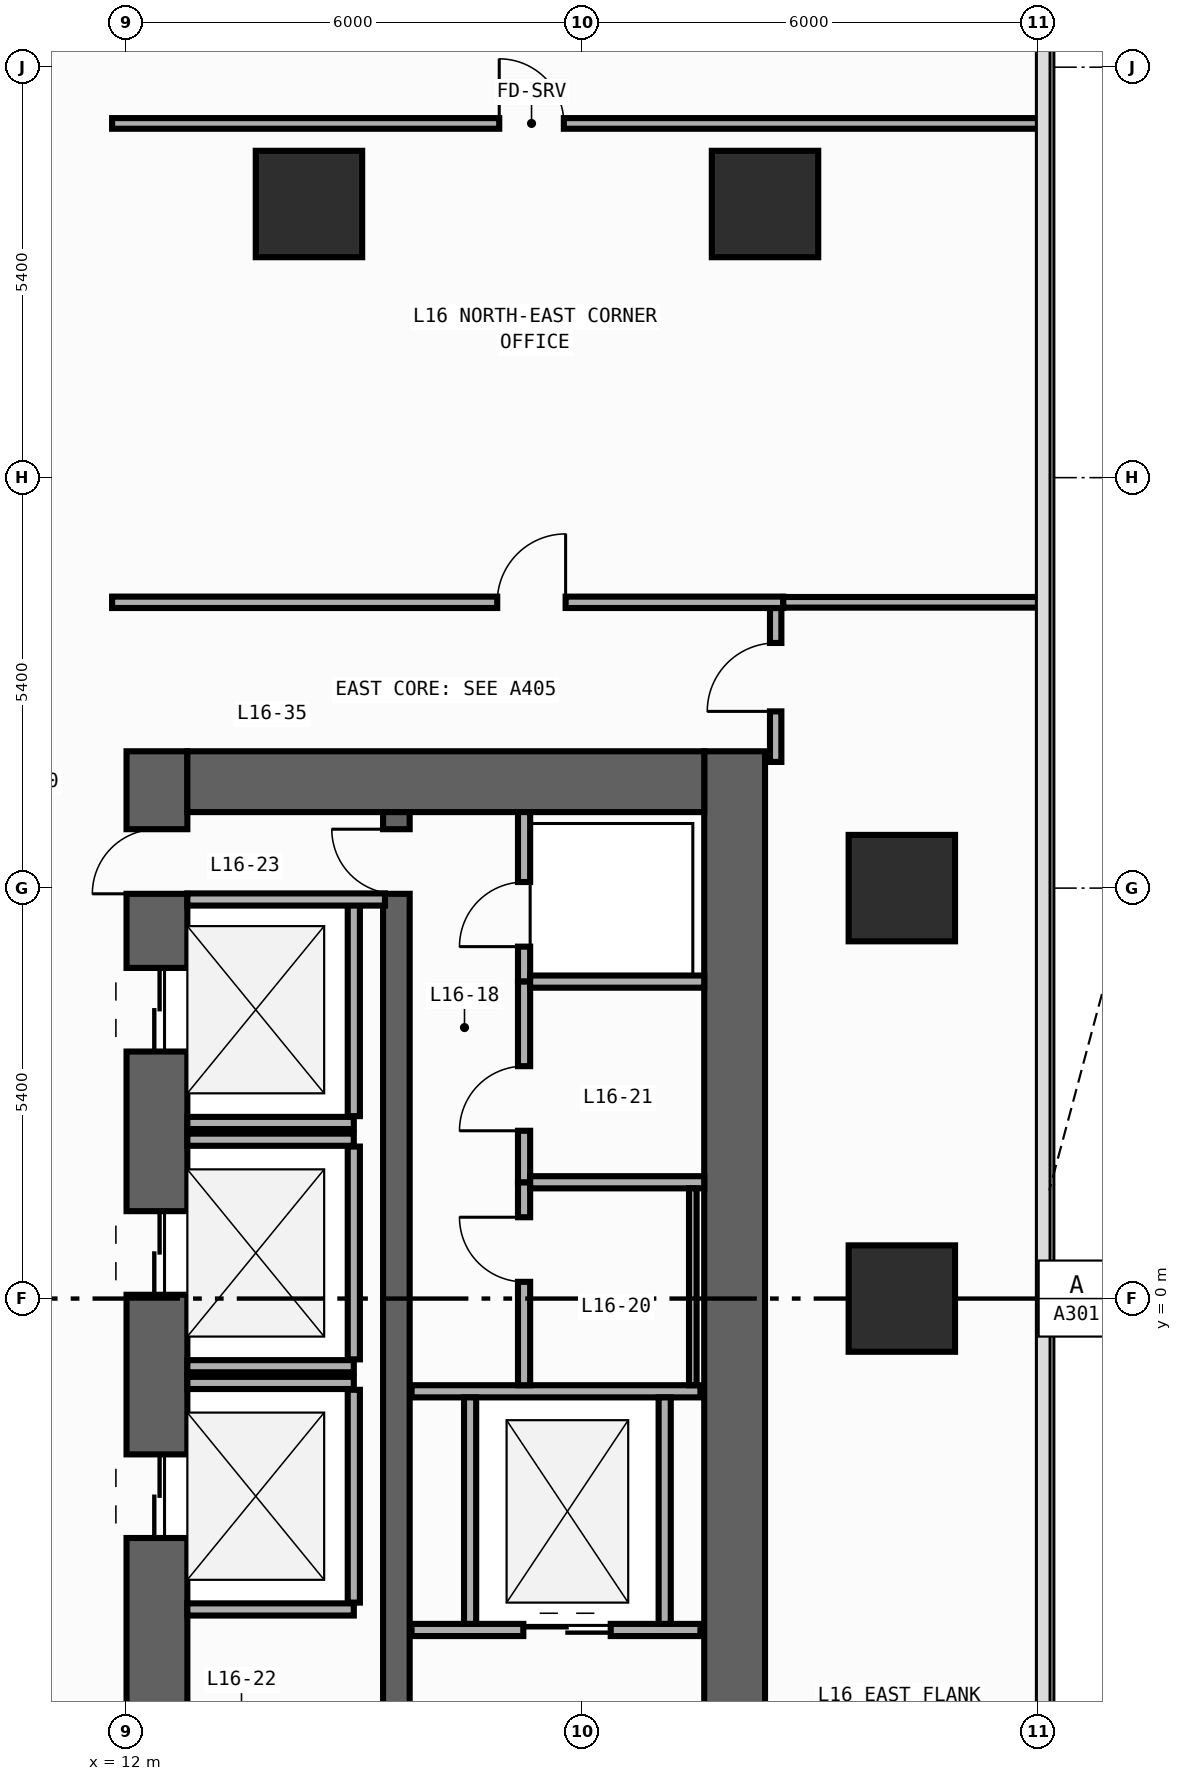
"""IFC4 building model, lengths in metres.
Left out: names, types, materials, properties, quantities, classifications, styles, units other than length and angle.
Written with IfcOpenShell. Run it as: python <this file> out.ifc"""

import sys

from ifc_helpers import new_model, si_unit, direction, frame, frame_2d, origin, origin_2d, place, context, subcontext, project, spatial, rectangle, extrude, element, fill, save


model = new_model("IFC4")
c1 = context("Model", 3, precision=1e-05, world=origin(), true_north=direction((0.0, 1.0)))
c2 = subcontext(c1, "Body", "Model", "MODEL_VIEW")
j1 = project(units=[si_unit("LENGTHUNIT", "METRE"), si_unit("PLANEANGLEUNIT", "RADIAN")], contexts=[c1])
p1 = place(None, origin())
s1 = spatial("IfcSite", under=j1, at=p1, CompositionType="ELEMENT")
p2 = place(p1, origin())
s2 = spatial("IfcBuilding", under=s1, at=p2, CompositionType="ELEMENT")
p3 = place(p2, frame((0.0, 0.0, 68.0)))
s3 = spatial("IfcBuildingStorey", under=s2, at=p3, CompositionType="ELEMENT", Elevation=68.0)
p4 = place(p3, frame((12.4, -19.8, 0.0), z_axis=(0.0, 0.0, 1.0), x_axis=(0.0, 1.0, 0.0)))
e1 = element("IfcWall", 1, at=p4, inside=s3, PredefinedType="SHEAR", context=c2, shape_type="SweptSolid", body=[
    extrude(rectangle(XDim=27.0, YDim=0.8, at=frame_2d((13.5, 0.0))), origin(), (0.0, 0.0, 1.0), 3.94),
])
p5 = place(p4, frame((23.05, 0.0, 0.0)))
e2 = element("IfcOpeningElement", 2, at=p5, cuts=e1, PredefinedType="OPENING", context=c2, shape_type="SweptSolid", body=[
    extrude(rectangle(XDim=1.1, YDim=2.2, at=frame_2d((0.55, 1.1))), frame((0.0, 0.41, 0.0), z_axis=(0.0, -1.0, 0.0), x_axis=(1.0, 0.0, 0.0)), (0.0, 0.0, 1.0), 0.82),
])
p6 = place(p4, frame((19.85, 0.0, 0.0)))
e3 = element("IfcOpeningElement", 3, at=p6, cuts=e1, PredefinedType="OPENING", context=c2, shape_type="SweptSolid", body=[
    extrude(rectangle(XDim=1.1, YDim=2.2, at=frame_2d((0.55, 1.1))), frame((0.0, 0.41, 0.0), z_axis=(0.0, -1.0, 0.0), x_axis=(1.0, 0.0, 0.0)), (0.0, 0.0, 1.0), 0.82),
])
p7 = place(p4, frame((16.65, 0.0, 0.0)))
e4 = element("IfcOpeningElement", 4, at=p7, cuts=e1, PredefinedType="OPENING", context=c2, shape_type="SweptSolid", body=[
    extrude(rectangle(XDim=1.1, YDim=2.2, at=frame_2d((0.55, 1.1))), frame((0.0, 0.41, 0.0), z_axis=(0.0, -1.0, 0.0), x_axis=(1.0, 0.0, 0.0)), (0.0, 0.0, 1.0), 0.82),
])
p8 = place(p4, frame((7.175, 0.0, 0.0)))
e5 = element("IfcOpeningElement", 5, at=p8, cuts=e1, PredefinedType="OPENING", context=c2, shape_type="SweptSolid", body=[
    extrude(rectangle(XDim=0.85, YDim=2.1, at=frame_2d((0.425, 1.05))), frame((0.0, 0.41, 0.0), z_axis=(0.0, -1.0, 0.0), x_axis=(1.0, 0.0, 0.0)), (0.0, 0.0, 1.0), 0.82),
])
p9 = place(p4, frame((10.375, 0.0, 0.0)))
e6 = element("IfcOpeningElement", 6, at=p9, cuts=e1, PredefinedType="OPENING", context=c2, shape_type="SweptSolid", body=[
    extrude(rectangle(XDim=0.85, YDim=2.1, at=frame_2d((0.425, 1.05))), frame((0.0, 0.41, 0.0), z_axis=(0.0, -1.0, 0.0), x_axis=(1.0, 0.0, 0.0)), (0.0, 0.0, 1.0), 0.82),
])
p10 = place(p4, frame((12.725, 0.0, 0.0)))
e7 = element("IfcOpeningElement", 7, at=p10, cuts=e1, PredefinedType="OPENING", context=c2, shape_type="SweptSolid", body=[
    extrude(rectangle(XDim=1.15, YDim=2.2, at=frame_2d((0.575, 1.1))), frame((0.0, 0.41, 0.0), z_axis=(0.0, -1.0, 0.0), x_axis=(1.0, 0.0, 0.0)), (0.0, 0.0, 1.0), 0.82),
])
p11 = place(p4, frame((25.125, 0.0, 0.0)))
e8 = element("IfcOpeningElement", 8, at=p11, cuts=e1, PredefinedType="OPENING", context=c2, shape_type="SweptSolid", body=[
    extrude(rectangle(XDim=0.85, YDim=2.1, at=frame_2d((0.425, 1.05))), frame((0.0, 0.41, 0.0), z_axis=(0.0, -1.0, 0.0), x_axis=(1.0, 0.0, 0.0)), (0.0, 0.0, 1.0), 0.82),
])
p12 = place(p3, frame((20.0, -19.8, 0.0), z_axis=(0.0, 0.0, 1.0), x_axis=(0.0, 1.0, 0.0)))
e9 = element("IfcWall", 9, at=p12, inside=s3, PredefinedType="SHEAR", context=c2, shape_type="SweptSolid", body=[
    extrude(rectangle(XDim=27.0, YDim=0.8, at=frame_2d((13.5, 0.0))), origin(), (0.0, 0.0, 1.0), 3.94),
])
p13 = place(p3, frame((12.8, 6.8, 0.0), z_axis=(0.0, 0.0, 1.0), x_axis=(1.0, 0.0, 0.0)))
e10 = element("IfcWall", 10, at=p13, inside=s3, PredefinedType="SHEAR", context=c2, shape_type="SweptSolid", body=[
    extrude(rectangle(XDim=6.8, YDim=0.8, at=frame_2d((3.4, 0.0))), origin(), (0.0, 0.0, 1.0), 3.94),
])
p14 = place(p3, frame((15.55, -19.0, 0.0), z_axis=(0.0, 0.0, 1.0), x_axis=(0.0, 1.0, 0.0)))
e11 = element("IfcWall", 11, at=p14, inside=s3, PredefinedType="SHEAR", context=c2, shape_type="SweptSolid", body=[
    extrude(rectangle(XDim=25.4, YDim=0.35, at=frame_2d((12.7, 0.0))), origin(), (0.0, 0.0, 1.0), 3.94),
])
p15 = place(p14, frame((11.925, 0.0, 0.0)))
e12 = element("IfcOpeningElement", 12, at=p15, cuts=e11, PredefinedType="OPENING", context=c2, shape_type="SweptSolid", body=[
    extrude(rectangle(XDim=1.15, YDim=2.2, at=frame_2d((0.575, 1.1))), frame((0.0, 0.185, 0.0), z_axis=(0.0, -1.0, 0.0), x_axis=(1.0, 0.0, 0.0)), (0.0, 0.0, 1.0), 0.37),
])
p16 = place(p14, frame((24.325, 0.0, 0.0)))
e13 = element("IfcOpeningElement", 13, at=p16, cuts=e11, PredefinedType="OPENING", context=c2, shape_type="SweptSolid", body=[
    extrude(rectangle(XDim=0.85, YDim=2.1, at=frame_2d((0.425, 1.05))), frame((0.0, 0.185, 0.0), z_axis=(0.0, -1.0, 0.0), x_axis=(1.0, 0.0, 0.0)), (0.0, 0.0, 1.0), 0.37),
])
for number, where, z_axis, x_axis in (
    (14, (20.4, 14.4, 0.0), (0.0, 0.0, 1.0), (1.0, 0.0, 0.0)),
    (15, (14.4, 14.4, 0.0), (0.0, 0.0, 1.0), (1.0, 0.0, 0.0)),
    (16, (22.2, 0.0, 0.0), (0.0, 0.0, 1.0), (1.0, 0.0, 0.0)),
    (17, (22.2, 5.4, 0.0), (0.0, 0.0, 1.0), (1.0, 0.0, 0.0)),
):
    element("IfcColumn", number, at=place(p3, frame(where, z_axis=z_axis, x_axis=x_axis)), inside=s3, PredefinedType="COLUMN", context=c2, shape_type="SweptSolid", body=[
        extrude(rectangle(XDim=1.4, YDim=1.4, at=origin_2d()), origin(), (0.0, 0.0, 1.0), 4.2),
    ])
p17 = place(p3, frame((12.8, 2.31, 0.0), z_axis=(0.0, 0.0, 1.0), x_axis=(1.0, 0.0, 0.0)))
e18 = element("IfcWall", 18, at=p17, inside=s3, PredefinedType="STANDARD", context=c2, shape_type="SweptSolid", body=[
    extrude(rectangle(XDim=2.19, YDim=0.16, at=frame_2d((1.095, 0.0))), origin(), (0.0, 0.0, 1.0), 3.94),
])
p18 = place(p3, frame((14.99, 2.4, 0.0), z_axis=(0.0, 0.0, 1.0), x_axis=(0.0, 1.0, 0.0)))
e19 = element("IfcWall", 19, at=p18, inside=s3, PredefinedType="STANDARD", context=c2, shape_type="SweptSolid", body=[
    extrude(rectangle(XDim=2.8, YDim=0.16, at=frame_2d((1.4, 0.0))), origin(), (0.0, 0.0, 1.0), 3.94),
])
for number, where, z_axis, x_axis in (
    (20, (12.8, -0.89, 0.0), (0.0, 0.0, 1.0), (1.0, 0.0, 0.0)),
    (21, (12.8, 2.09, 0.0), (0.0, 0.0, 1.0), (1.0, 0.0, 0.0)),
):
    element("IfcWall", number, at=place(p3, frame(where, z_axis=z_axis, x_axis=x_axis)), inside=s3, PredefinedType="STANDARD", context=c2, shape_type="SweptSolid", body=[
        extrude(rectangle(XDim=2.19, YDim=0.16, at=frame_2d((1.095, 0.0))), origin(), (0.0, 0.0, 1.0), 3.94),
    ])
p19 = place(p3, frame((14.99, -0.8, 0.0), z_axis=(0.0, 0.0, 1.0), x_axis=(0.0, 1.0, 0.0)))
e22 = element("IfcWall", 22, at=p19, inside=s3, PredefinedType="STANDARD", context=c2, shape_type="SweptSolid", body=[
    extrude(rectangle(XDim=2.8, YDim=0.16, at=frame_2d((1.4, 0.0))), origin(), (0.0, 0.0, 1.0), 3.94),
])
for number, where, z_axis, x_axis in (
    (23, (12.8, -4.09, 0.0), (0.0, 0.0, 1.0), (1.0, 0.0, 0.0)),
    (24, (12.8, -1.11, 0.0), (0.0, 0.0, 1.0), (1.0, 0.0, 0.0)),
):
    element("IfcWall", number, at=place(p3, frame(where, z_axis=z_axis, x_axis=x_axis)), inside=s3, PredefinedType="STANDARD", context=c2, shape_type="SweptSolid", body=[
        extrude(rectangle(XDim=2.19, YDim=0.16, at=frame_2d((1.095, 0.0))), origin(), (0.0, 0.0, 1.0), 3.94),
    ])
p20 = place(p3, frame((14.99, -4.0, 0.0), z_axis=(0.0, 0.0, 1.0), x_axis=(0.0, 1.0, 0.0)))
e25 = element("IfcWall", 25, at=p20, inside=s3, PredefinedType="STANDARD", context=c2, shape_type="SweptSolid", body=[
    extrude(rectangle(XDim=2.8, YDim=0.16, at=frame_2d((1.4, 0.0))), origin(), (0.0, 0.0, 1.0), 3.94),
])
p21 = place(p3, frame((15.75, -4.36, 0.0), z_axis=(0.0, 0.0, 1.0), x_axis=(1.0, 0.0, 0.0)))
e26 = element("IfcWall", 26, at=p21, inside=s3, PredefinedType="STANDARD", context=c2, shape_type="SweptSolid", body=[
    extrude(rectangle(XDim=3.8, YDim=0.16, at=frame_2d((1.9, 0.0))), origin(), (0.0, 0.0, 1.0), 3.94),
])
p22 = place(p21, frame((1.47, 0.0, 0.0)))
e27 = element("IfcOpeningElement", 27, at=p22, cuts=e26, PredefinedType="OPENING", context=c2, shape_type="SweptSolid", body=[
    extrude(rectangle(XDim=1.15, YDim=2.2, at=frame_2d((0.575, 1.1))), frame((0.0, 0.09, 0.0), z_axis=(0.0, -1.0, 0.0), x_axis=(1.0, 0.0, 0.0)), (0.0, 0.0, 1.0), 0.18),
])
p23 = place(p3, frame((15.75, -1.22, 0.0), z_axis=(0.0, 0.0, 1.0), x_axis=(1.0, 0.0, 0.0)))
e28 = element("IfcWall", 28, at=p23, inside=s3, PredefinedType="STANDARD", context=c2, shape_type="SweptSolid", body=[
    extrude(rectangle(XDim=3.8, YDim=0.16, at=frame_2d((1.9, 0.0))), origin(), (0.0, 0.0, 1.0), 3.94),
])
for number, where, z_axis, x_axis in (
    (29, (16.52, -4.28, 0.0), (0.0, 0.0, 1.0), (0.0, 1.0, 0.0)),
    (30, (19.08, -4.28, 0.0), (0.0, 0.0, 1.0), (0.0, 1.0, 0.0)),
):
    element("IfcWall", number, at=place(p3, frame(where, z_axis=z_axis, x_axis=x_axis)), inside=s3, PredefinedType="STANDARD", context=c2, shape_type="SweptSolid", body=[
        extrude(rectangle(XDim=2.98, YDim=0.16, at=frame_2d((1.49, 0.0))), origin(), (0.0, 0.0, 1.0), 3.94),
    ])
p24 = place(p3, frame((12.8, 5.25, 0.0), z_axis=(0.0, 0.0, 1.0), x_axis=(1.0, 0.0, 0.0)))
e31 = element("IfcWall", 31, at=p24, inside=s3, PredefinedType="STANDARD", context=c2, shape_type="SweptSolid", body=[
    extrude(rectangle(XDim=2.6, YDim=0.16, at=frame_2d((1.3, 0.0))), origin(), (0.0, 0.0, 1.0), 3.94),
])
p25 = place(p3, frame((17.23, 4.17, 0.0), z_axis=(0.0, 0.0, 1.0), x_axis=(0.0, 1.0, 0.0)))
e32 = element("IfcWall", 32, at=p25, inside=s3, PredefinedType="PARTITIONING", context=c2, shape_type="SweptSolid", body=[
    extrude(rectangle(XDim=2.23, YDim=0.16, at=frame_2d((1.115, 0.0))), origin(), (0.0, 0.0, 1.0), 3.94),
])
p26 = place(p25, frame((0.46, 0.0, 0.0)))
e33 = element("IfcOpeningElement", 33, at=p26, cuts=e32, PredefinedType="OPENING", context=c2, shape_type="SweptSolid", body=[
    extrude(rectangle(XDim=0.85, YDim=2.1, at=frame_2d((0.425, 1.05))), frame((0.0, 0.09, 0.0), z_axis=(0.0, -1.0, 0.0), x_axis=(1.0, 0.0, 0.0)), (0.0, 0.0, 1.0), 0.18),
])
p27 = place(p3, frame((17.23, -1.14, 0.0), z_axis=(0.0, 0.0, 1.0), x_axis=(0.0, 1.0, 0.0)))
e34 = element("IfcWall", 34, at=p27, inside=s3, PredefinedType="PARTITIONING", context=c2, shape_type="SweptSolid", body=[
    extrude(rectangle(XDim=2.67, YDim=0.16, at=frame_2d((1.335, 0.0))), origin(), (0.0, 0.0, 1.0), 3.94),
])
p28 = place(p27, frame((1.36, 0.0, 0.0)))
e35 = element("IfcOpeningElement", 35, at=p28, cuts=e34, PredefinedType="OPENING", context=c2, shape_type="SweptSolid", body=[
    extrude(rectangle(XDim=0.85, YDim=2.1, at=frame_2d((0.425, 1.05))), frame((0.0, 0.09, 0.0), z_axis=(0.0, -1.0, 0.0), x_axis=(1.0, 0.0, 0.0)), (0.0, 0.0, 1.0), 0.18),
])
p29 = place(p3, frame((17.23, 1.53, 0.0), z_axis=(0.0, 0.0, 1.0), x_axis=(0.0, 1.0, 0.0)))
e36 = element("IfcWall", 36, at=p29, inside=s3, PredefinedType="PARTITIONING", context=c2, shape_type="SweptSolid", body=[
    extrude(rectangle(XDim=2.64, YDim=0.16, at=frame_2d((1.32, 0.0))), origin(), (0.0, 0.0, 1.0), 3.94),
])
p30 = place(p29, frame((0.677, 0.0, 0.0)))
e37 = element("IfcOpeningElement", 37, at=p30, cuts=e36, PredefinedType="OPENING", context=c2, shape_type="SweptSolid", body=[
    extrude(rectangle(XDim=0.85, YDim=2.1, at=frame_2d((0.425, 1.05))), frame((0.0, 0.09, 0.0), z_axis=(0.0, -1.0, 0.0), x_axis=(1.0, 0.0, 0.0)), (0.0, 0.0, 1.0), 0.18),
])
for number, where, z_axis, x_axis in (
    (38, (17.31, 4.17, 0.0), (0.0, 0.0, 1.0), (1.0, 0.0, 0.0)),
    (39, (17.31, 1.53, 0.0), (0.0, 0.0, 1.0), (1.0, 0.0, 0.0)),
):
    element("IfcWall", number, at=place(p3, frame(where, z_axis=z_axis, x_axis=x_axis)), inside=s3, PredefinedType="PARTITIONING", context=c2, shape_type="SweptSolid", body=[
        extrude(rectangle(XDim=2.29, YDim=0.16, at=frame_2d((1.145, 0.0))), origin(), (0.0, 0.0, 1.0), 3.94),
    ])
p31 = place(p3, frame((20.54, 7.06, 0.0), z_axis=(0.0, 0.0, 1.0), x_axis=(0.0, 1.0, 0.0)))
e40 = element("IfcWall", 40, at=p31, inside=s3, PredefinedType="PARTITIONING", context=c2, shape_type="SweptSolid", body=[
    extrude(rectangle(XDim=2.025, YDim=0.15, at=frame_2d((1.012, 0.0))), origin(), (0.0, 0.0, 1.0), 3.94),
])
p32 = place(p31, frame((0.665, 0.0, 0.0)))
e41 = element("IfcOpeningElement", 41, at=p32, cuts=e40, PredefinedType="OPENING", context=c2, shape_type="SweptSolid", body=[
    extrude(rectangle(XDim=0.9, YDim=2.15, at=frame_2d((0.45, 1.075))), frame((0.0, 0.085, 0.0), z_axis=(0.0, -1.0, 0.0), x_axis=(1.0, 0.0, 0.0)), (0.0, 0.0, 1.0), 0.17),
])
p33 = place(p3, frame((11.81, 9.16, 0.0), z_axis=(0.0, 0.0, 1.0), x_axis=(1.0, 0.0, 0.0)))
e42 = element("IfcWall", 42, at=p33, inside=s3, PredefinedType="PARTITIONING", context=c2, shape_type="SweptSolid", body=[
    extrude(rectangle(XDim=8.83, YDim=0.15, at=frame_2d((4.415, 0.0))), origin(), (0.0, 0.0, 1.0), 3.94),
])
p34 = place(p33, frame((5.067, 0.0, 0.0)))
e43 = element("IfcOpeningElement", 43, at=p34, cuts=e42, PredefinedType="OPENING", context=c2, shape_type="SweptSolid", body=[
    extrude(rectangle(XDim=0.9, YDim=2.15, at=frame_2d((0.45, 1.075))), frame((0.0, 0.085, 0.0), z_axis=(0.0, -1.0, 0.0), x_axis=(1.0, 0.0, 0.0)), (0.0, 0.0, 1.0), 0.17),
])
p35 = place(p3, frame((20.64, 9.16, 0.0), z_axis=(0.0, 0.0, 1.0), x_axis=(1.0, 0.0, 0.0)))
e44 = element("IfcWall", 44, at=p35, inside=s3, PredefinedType="PARTITIONING", context=c2, shape_type="SweptSolid", body=[
    extrude(rectangle(XDim=3.415, YDim=0.14, at=frame_2d((1.708, 0.0))), origin(), (0.0, 0.0, 1.0), 3.94),
])
p36 = place(p3, frame((11.81, 15.46, 0.0), z_axis=(0.0, 0.0, 1.0), x_axis=(1.0, 0.0, 0.0)))
e45 = element("IfcWall", 45, at=p36, inside=s3, PredefinedType="PARTITIONING", context=c2, shape_type="SweptSolid", body=[
    extrude(rectangle(XDim=12.245, YDim=0.14, at=frame_2d((6.123, 0.0))), origin(), (0.0, 0.0, 1.0), 3.94),
])
p37 = place(p36, frame((5.093, 0.0, 0.0)))
e46 = element("IfcOpeningElement", 46, at=p37, cuts=e45, PredefinedType="OPENING", context=c2, shape_type="SweptSolid", body=[
    extrude(rectangle(XDim=0.85, YDim=2.1, at=frame_2d((0.425, 1.05))), frame((0.0, 0.08, 0.0), z_axis=(0.0, -1.0, 0.0), x_axis=(1.0, 0.0, 0.0)), (0.0, 0.0, 1.0), 0.16),
])
p38 = place(p3, frame((19.45, 1.45, 0.0), z_axis=(0.0, 0.0, 1.0), x_axis=(0.0, -1.0, 0.0)))
e47 = element("IfcWall", 47, at=p38, inside=s3, PredefinedType="PARTITIONING", context=c2, shape_type="SweptSolid", body=[
    extrude(rectangle(XDim=2.59, YDim=0.1, at=frame_2d((1.295, 0.0))), origin(), (0.0, 0.0, 1.0), 3.94),
])
p39 = place(p5, origin())
e48 = element("IfcDoor", 48, at=p39, inside=s3, OperationType="DOUBLE_DOOR_SLIDING", PredefinedType="DOOR", context=c2, shape_type="SweptSolid", body=[
    extrude(rectangle(XDim=1.1, YDim=2.2, at=frame_2d((0.55, 1.1))), frame((0.0, 0.025, 0.0), z_axis=(0.0, -1.0, 0.0), x_axis=(1.0, 0.0, 0.0)), (0.0, 0.0, 1.0), 0.05),
])
fill(e2, e48)
p40 = place(p6, origin())
e49 = element("IfcDoor", 49, at=p40, inside=s3, OperationType="DOUBLE_DOOR_SLIDING", PredefinedType="DOOR", context=c2, shape_type="SweptSolid", body=[
    extrude(rectangle(XDim=1.1, YDim=2.2, at=frame_2d((0.55, 1.1))), frame((0.0, 0.025, 0.0), z_axis=(0.0, -1.0, 0.0), x_axis=(1.0, 0.0, 0.0)), (0.0, 0.0, 1.0), 0.05),
])
fill(e3, e49)
p41 = place(p7, origin())
e50 = element("IfcDoor", 50, at=p41, inside=s3, OperationType="DOUBLE_DOOR_SLIDING", PredefinedType="DOOR", context=c2, shape_type="SweptSolid", body=[
    extrude(rectangle(XDim=1.1, YDim=2.2, at=frame_2d((0.55, 1.1))), frame((0.0, 0.025, 0.0), z_axis=(0.0, -1.0, 0.0), x_axis=(1.0, 0.0, 0.0)), (0.0, 0.0, 1.0), 0.05),
])
fill(e4, e50)
p42 = place(p11, origin())
e51 = element("IfcDoor", 51, at=p42, inside=s3, OperationType="SINGLE_SWING_LEFT", PredefinedType="DOOR", context=c2, shape_type="SweptSolid", body=[
    extrude(rectangle(XDim=0.85, YDim=2.1, at=frame_2d((0.425, 1.05))), frame((0.0, 0.025, 0.0), z_axis=(0.0, -1.0, 0.0), x_axis=(1.0, 0.0, 0.0)), (0.0, 0.0, 1.0), 0.05),
])
fill(e8, e51)
p43 = place(p16, origin())
e52 = element("IfcDoor", 52, at=p43, inside=s3, OperationType="SINGLE_SWING_RIGHT", PredefinedType="DOOR", context=c2, shape_type="SweptSolid", body=[
    extrude(rectangle(XDim=0.85, YDim=2.1, at=frame_2d((0.425, 1.05))), frame((0.0, 0.025, 0.0), z_axis=(0.0, -1.0, 0.0), x_axis=(1.0, 0.0, 0.0)), (0.0, 0.0, 1.0), 0.05),
])
fill(e13, e52)
p44 = place(p22, origin())
e53 = element("IfcDoor", 53, at=p44, inside=s3, OperationType="DOUBLE_DOOR_SLIDING", PredefinedType="DOOR", context=c2, shape_type="SweptSolid", body=[
    extrude(rectangle(XDim=1.15, YDim=2.2, at=frame_2d((0.575, 1.1))), frame((0.0, 0.025, 0.0), z_axis=(0.0, -1.0, 0.0), x_axis=(1.0, 0.0, 0.0)), (0.0, 0.0, 1.0), 0.05),
])
fill(e27, e53)
p45 = place(p26, origin())
e54 = element("IfcDoor", 54, at=p45, inside=s3, OperationType="SINGLE_SWING_LEFT", PredefinedType="DOOR", context=c2, shape_type="SweptSolid", body=[
    extrude(rectangle(XDim=0.85, YDim=2.1, at=frame_2d((0.425, 1.05))), frame((0.0, 0.025, 0.0), z_axis=(0.0, -1.0, 0.0), x_axis=(1.0, 0.0, 0.0)), (0.0, 0.0, 1.0), 0.05),
])
fill(e33, e54)
p46 = place(p28, origin())
e55 = element("IfcDoor", 55, at=p46, inside=s3, OperationType="SINGLE_SWING_RIGHT", PredefinedType="DOOR", context=c2, shape_type="SweptSolid", body=[
    extrude(rectangle(XDim=0.85, YDim=2.1, at=frame_2d((0.425, 1.05))), frame((0.0, 0.025, 0.0), z_axis=(0.0, -1.0, 0.0), x_axis=(1.0, 0.0, 0.0)), (0.0, 0.0, 1.0), 0.05),
])
fill(e35, e55)
p47 = place(p30, origin())
e56 = element("IfcDoor", 56, at=p47, inside=s3, OperationType="SINGLE_SWING_LEFT", PredefinedType="DOOR", context=c2, shape_type="SweptSolid", body=[
    extrude(rectangle(XDim=0.85, YDim=2.1, at=frame_2d((0.425, 1.05))), frame((0.0, 0.025, 0.0), z_axis=(0.0, -1.0, 0.0), x_axis=(1.0, 0.0, 0.0)), (0.0, 0.0, 1.0), 0.05),
])
fill(e37, e56)
p48 = place(p32, origin())
e57 = element("IfcDoor", 57, at=p48, inside=s3, OperationType="SINGLE_SWING_LEFT", PredefinedType="DOOR", context=c2, shape_type="SweptSolid", body=[
    extrude(rectangle(XDim=0.9, YDim=2.15, at=frame_2d((0.45, 1.075))), frame((0.0, 0.025, 0.0), z_axis=(0.0, -1.0, 0.0), x_axis=(1.0, 0.0, 0.0)), (0.0, 0.0, 1.0), 0.05),
])
fill(e41, e57)
p49 = place(p34, origin())
e58 = element("IfcDoor", 58, at=p49, inside=s3, OperationType="SINGLE_SWING_RIGHT", PredefinedType="DOOR", context=c2, shape_type="SweptSolid", body=[
    extrude(rectangle(XDim=0.9, YDim=2.15, at=frame_2d((0.45, 1.075))), frame((0.0, 0.025, 0.0), z_axis=(0.0, -1.0, 0.0), x_axis=(1.0, 0.0, 0.0)), (0.0, 0.0, 1.0), 0.05),
])
fill(e43, e58)
p50 = place(p37, origin())
e59 = element("IfcDoor", 59, at=p50, inside=s3, OperationType="SINGLE_SWING_LEFT", PredefinedType="DOOR", context=c2, shape_type="SweptSolid", body=[
    extrude(rectangle(XDim=0.85, YDim=2.1, at=frame_2d((0.425, 1.05))), frame((0.0, 0.025, 0.0), z_axis=(0.0, -1.0, 0.0), x_axis=(1.0, 0.0, 0.0)), (0.0, 0.0, 1.0), 0.05),
])
fill(e46, e59)
save(model, sys.argv[1])
